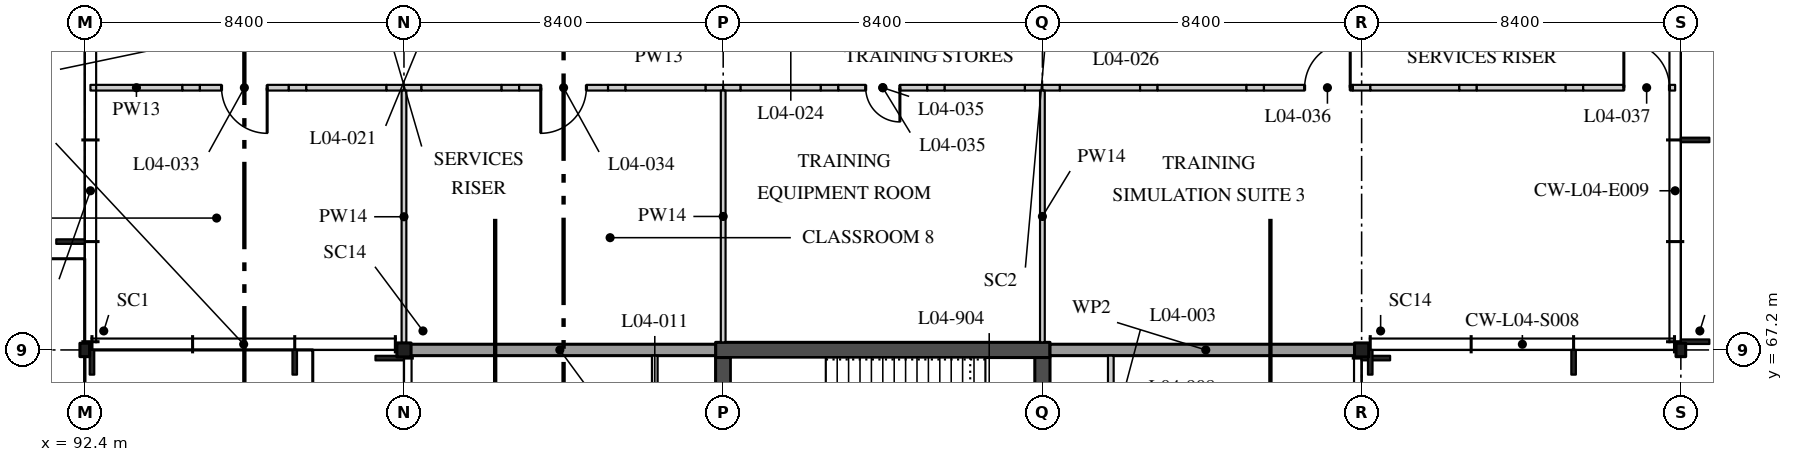
"""IFC4 building model, lengths in metres.
Left out: names, types, materials, properties, quantities, classifications, styles, units other than length and angle.
Written with IfcOpenShell. Run it as: python <this file> out.ifc"""

import sys

from ifc_helpers import new_model, si_unit, direction, frame, frame_2d, origin, origin_2d, place, context, subcontext, project, spatial, rectangle, i_section, extrude, element, fill, save


model = new_model("IFC4")
c1 = context("Model", 3, precision=1e-05, world=origin(), true_north=direction((0.0, 1.0)))
c2 = subcontext(c1, "Body", "Model", "MODEL_VIEW")
j1 = project(units=[si_unit("LENGTHUNIT", "METRE"), si_unit("PLANEANGLEUNIT", "RADIAN")], contexts=[c1])
p1 = place(None, origin())
s1 = spatial("IfcSite", under=j1, at=p1, CompositionType="ELEMENT")
p2 = place(p1, origin())
s2 = spatial("IfcBuilding", under=s1, at=p2, CompositionType="ELEMENT")
p3 = place(p2, frame((0.0, 0.0, 18.9)))
s3 = spatial("IfcBuildingStorey", under=s2, at=p3, CompositionType="ELEMENT", Elevation=18.9)
p4 = place(p3, frame((92.4, 67.2, 0.0), z_axis=(0.0, 0.0, 1.0), x_axis=(1.0, 0.0, 0.0)))
e1 = element("IfcColumn", 1, at=p4, inside=s3, PredefinedType="COLUMN", context=c2, shape_type="SweptSolid", body=[
    extrude(i_section(OverallWidth=0.254, OverallDepth=0.353, WebThickness=0.01, FlangeThickness=0.016, FilletRadius=0.015, at=origin_2d()), origin(), (0.0, 0.0, 1.0), 4.37),
])
for number, where, z_axis, x_axis in (
    (2, (100.8, 67.2, 0.0), (0.0, 0.0, 1.0), (1.0, 0.0, 0.0)),
    (3, (126.0, 67.2, 0.0), (0.0, 0.0, 1.0), (1.0, 0.0, 0.0)),
):
    element("IfcColumn", number, at=place(p3, frame(where, z_axis=z_axis, x_axis=x_axis)), inside=s3, PredefinedType="COLUMN", context=c2, shape_type="SweptSolid", body=[
        extrude(i_section(OverallWidth=0.373, OverallDepth=0.368, WebThickness=0.015, FlangeThickness=0.024, FilletRadius=0.015, at=origin_2d()), origin(), (0.0, 0.0, 1.0), 4.37),
    ])
p5 = place(p3, frame((134.4, 67.2, 0.0), z_axis=(0.0, 0.0, 1.0), x_axis=(1.0, 0.0, 0.0)))
e4 = element("IfcColumn", 4, at=p5, inside=s3, PredefinedType="COLUMN", context=c2, shape_type="SweptSolid", body=[
    extrude(i_section(OverallWidth=0.254, OverallDepth=0.353, WebThickness=0.01, FlangeThickness=0.016, FilletRadius=0.015, at=origin_2d()), origin(), (0.0, 0.0, 1.0), 4.37),
])
p6 = place(p3, frame((109.0, 67.2, 0.0), z_axis=(0.0, 0.0, 1.0), x_axis=(1.0, 0.0, 0.0)))
e5 = element("IfcWall", 5, at=p6, inside=s3, PredefinedType="SHEAR", context=c2, shape_type="SweptSolid", body=[
    extrude(rectangle(XDim=8.8, YDim=0.4, at=frame_2d((4.4, 0.0))), origin(), (0.0, 0.0, 1.0), 4.37),
])
p7 = place(p3, frame((109.2, 59.0, 0.0), z_axis=(0.0, 0.0, 1.0), x_axis=(0.0, 1.0, 0.0)))
e6 = element("IfcWall", 6, at=p7, inside=s3, PredefinedType="SHEAR", context=c2, shape_type="SweptSolid", body=[
    extrude(rectangle(XDim=8.0, YDim=0.4, at=frame_2d((4.0, 0.0))), origin(), (0.0, 0.0, 1.0), 4.37),
])
p8 = place(p7, frame((2.925, 0.0, 0.0)))
e7 = element("IfcOpeningElement", 7, at=p8, cuts=e6, PredefinedType="OPENING", context=c2, shape_type="SweptSolid", body=[
    extrude(rectangle(XDim=1.2, YDim=2.1, at=frame_2d((0.6, 1.05))), frame((0.0, 0.21, 0.0), z_axis=(0.0, -1.0, 0.0), x_axis=(1.0, 0.0, 0.0)), (0.0, 0.0, 1.0), 0.42),
])
p9 = place(p3, frame((117.6, 59.0, 0.0), z_axis=(0.0, 0.0, 1.0), x_axis=(0.0, 1.0, 0.0)))
e8 = element("IfcWall", 8, at=p9, inside=s3, PredefinedType="SHEAR", context=c2, shape_type="SweptSolid", body=[
    extrude(rectangle(XDim=8.0, YDim=0.4, at=frame_2d((4.0, 0.0))), origin(), (0.0, 0.0, 1.0), 4.37),
])
p10 = place(p9, frame((2.925, 0.0, 0.0)))
e9 = element("IfcOpeningElement", 9, at=p10, cuts=e8, PredefinedType="OPENING", context=c2, shape_type="SweptSolid", body=[
    extrude(rectangle(XDim=1.2, YDim=2.1, at=frame_2d((0.6, 1.05))), frame((0.0, 0.21, 0.0), z_axis=(0.0, -1.0, 0.0), x_axis=(1.0, 0.0, 0.0)), (0.0, 0.0, 1.0), 0.42),
])
p11 = place(p3, frame((119.4, 63.0, 0.0), z_axis=(0.0, 0.0, 1.0), x_axis=(0.0, 1.0, 0.0)))
e10 = element("IfcWall", 10, at=p11, inside=s3, PredefinedType="PARTITIONING", context=c2, shape_type="SweptSolid", body=[
    extrude(rectangle(XDim=4.05, YDim=0.15, at=frame_2d((2.025, 0.0))), origin(), (0.0, 0.0, 1.0), 4.37),
])
p12 = place(p11, frame((1.35, 0.0, 0.0)))
e11 = element("IfcOpeningElement", 11, at=p12, cuts=e10, PredefinedType="OPENING", context=c2, shape_type="SweptSolid", body=[
    extrude(rectangle(XDim=0.9, YDim=2.1, at=frame_2d((0.45, 1.05))), frame((0.0, 0.085, 0.0), z_axis=(0.0, -1.0, 0.0), x_axis=(1.0, 0.0, 0.0)), (0.0, 0.0, 1.0), 0.17),
])
p13 = place(p3, frame((107.4, 59.26, 0.0), z_axis=(0.0, 0.0, 1.0), x_axis=(0.0, 1.0, 0.0)))
e12 = element("IfcWall", 12, at=p13, inside=s3, PredefinedType="PARTITIONING", context=c2, shape_type="SweptSolid", body=[
    extrude(rectangle(XDim=7.79, YDim=0.15, at=frame_2d((3.895, 0.0))), origin(), (0.0, 0.0, 1.0), 4.37),
])
p14 = place(p13, frame((2.79, 0.0, 0.0)))
e13 = element("IfcOpeningElement", 13, at=p14, cuts=e12, PredefinedType="OPENING", context=c2, shape_type="SweptSolid", body=[
    extrude(rectangle(XDim=1.35, YDim=2.1, at=frame_2d((0.675, 1.05))), frame((0.0, 0.085, 0.0), z_axis=(0.0, -1.0, 0.0), x_axis=(1.0, 0.0, 0.0)), (0.0, 0.0, 1.0), 0.17),
])
p15 = place(p3, frame((92.55, 74.1, 0.0), z_axis=(0.0, 0.0, 1.0), x_axis=(1.0, 0.0, 0.0)))
e14 = element("IfcWall", 14, at=p15, inside=s3, PredefinedType="PARTITIONING", context=c2, shape_type="SweptSolid", body=[
    extrude(rectangle(XDim=2.42, YDim=0.15, at=frame_2d((1.21, 0.0))), origin(), (0.0, 0.0, 1.0), 4.37),
])
p16 = place(p3, frame((94.97, 74.1, 0.0), z_axis=(0.0, 0.0, 1.0), x_axis=(1.0, 0.0, 0.0)))
e15 = element("IfcWall", 15, at=p16, inside=s3, PredefinedType="PARTITIONING", context=c2, shape_type="SweptSolid", body=[
    extrude(rectangle(XDim=0.46, YDim=0.15, at=frame_2d((0.23, 0.0))), origin(), (0.0, 0.0, 1.0), 3.946),
])
p17 = place(p3, frame((95.43, 74.1, 0.0), z_axis=(0.0, 0.0, 1.0), x_axis=(1.0, 0.0, 0.0)))
e16 = element("IfcWall", 16, at=p17, inside=s3, PredefinedType="PARTITIONING", context=c2, shape_type="SweptSolid", body=[
    extrude(rectangle(XDim=2.34, YDim=0.15, at=frame_2d((1.17, 0.0))), origin(), (0.0, 0.0, 1.0), 4.37),
])
p18 = place(p17, frame((0.57, 0.0, 0.0)))
e17 = element("IfcOpeningElement", 17, at=p18, cuts=e16, PredefinedType="OPENING", context=c2, shape_type="SweptSolid", body=[
    extrude(rectangle(XDim=1.2, YDim=2.4, at=frame_2d((0.6, 1.2))), frame((0.0, 0.085, 0.0), z_axis=(0.0, -1.0, 0.0), x_axis=(1.0, 0.0, 0.0)), (0.0, 0.0, 1.0), 0.17),
])
p19 = place(p3, frame((97.77, 74.1, 0.0), z_axis=(0.0, 0.0, 1.0), x_axis=(1.0, 0.0, 0.0)))
e18 = element("IfcWall", 18, at=p19, inside=s3, PredefinedType="PARTITIONING", context=c2, shape_type="SweptSolid", body=[
    extrude(rectangle(XDim=0.46, YDim=0.15, at=frame_2d((0.23, 0.0))), origin(), (0.0, 0.0, 1.0), 3.946),
])
p20 = place(p3, frame((98.23, 74.1, 0.0), z_axis=(0.0, 0.0, 1.0), x_axis=(1.0, 0.0, 0.0)))
e19 = element("IfcWall", 19, at=p20, inside=s3, PredefinedType="PARTITIONING", context=c2, shape_type="SweptSolid", body=[
    extrude(rectangle(XDim=2.11, YDim=0.15, at=frame_2d((1.055, 0.0))), origin(), (0.0, 0.0, 1.0), 4.37),
])
for number, where, z_axis, x_axis in (
    (20, (100.34, 74.1, 0.0), (0.0, 0.0, 1.0), (1.0, 0.0, 0.0)),
    (21, (100.8, 74.1, 0.0), (0.0, 0.0, 1.0), (1.0, 0.0, 0.0)),
):
    element("IfcWall", number, at=place(p3, frame(where, z_axis=z_axis, x_axis=x_axis)), inside=s3, PredefinedType="PARTITIONING", context=c2, shape_type="SweptSolid", body=[
        extrude(rectangle(XDim=0.46, YDim=0.15, at=frame_2d((0.23, 0.0))), origin(), (0.0, 0.0, 1.0), 3.819),
    ])
p21 = place(p3, frame((101.26, 74.1, 0.0), z_axis=(0.0, 0.0, 1.0), x_axis=(1.0, 0.0, 0.0)))
e22 = element("IfcWall", 22, at=p21, inside=s3, PredefinedType="PARTITIONING", context=c2, shape_type="SweptSolid", body=[
    extrude(rectangle(XDim=2.11, YDim=0.15, at=frame_2d((1.055, 0.0))), origin(), (0.0, 0.0, 1.0), 4.37),
])
p22 = place(p3, frame((103.37, 74.1, 0.0), z_axis=(0.0, 0.0, 1.0), x_axis=(1.0, 0.0, 0.0)))
e23 = element("IfcWall", 23, at=p22, inside=s3, PredefinedType="PARTITIONING", context=c2, shape_type="SweptSolid", body=[
    extrude(rectangle(XDim=0.46, YDim=0.15, at=frame_2d((0.23, 0.0))), origin(), (0.0, 0.0, 1.0), 3.946),
])
p23 = place(p3, frame((103.83, 74.1, 0.0), z_axis=(0.0, 0.0, 1.0), x_axis=(1.0, 0.0, 0.0)))
e24 = element("IfcWall", 24, at=p23, inside=s3, PredefinedType="PARTITIONING", context=c2, shape_type="SweptSolid", body=[
    extrude(rectangle(XDim=2.34, YDim=0.15, at=frame_2d((1.17, 0.0))), origin(), (0.0, 0.0, 1.0), 4.37),
])
p24 = place(p23, frame((0.57, 0.0, 0.0)))
e25 = element("IfcOpeningElement", 25, at=p24, cuts=e24, PredefinedType="OPENING", context=c2, shape_type="SweptSolid", body=[
    extrude(rectangle(XDim=1.2, YDim=2.4, at=frame_2d((0.6, 1.2))), frame((0.0, 0.085, 0.0), z_axis=(0.0, -1.0, 0.0), x_axis=(1.0, 0.0, 0.0)), (0.0, 0.0, 1.0), 0.17),
])
p25 = place(p3, frame((106.17, 74.1, 0.0), z_axis=(0.0, 0.0, 1.0), x_axis=(1.0, 0.0, 0.0)))
e26 = element("IfcWall", 26, at=p25, inside=s3, PredefinedType="PARTITIONING", context=c2, shape_type="SweptSolid", body=[
    extrude(rectangle(XDim=0.46, YDim=0.15, at=frame_2d((0.23, 0.0))), origin(), (0.0, 0.0, 1.0), 3.946),
])
p26 = place(p3, frame((106.63, 74.1, 0.0), z_axis=(0.0, 0.0, 1.0), x_axis=(1.0, 0.0, 0.0)))
e27 = element("IfcWall", 27, at=p26, inside=s3, PredefinedType="PARTITIONING", context=c2, shape_type="SweptSolid", body=[
    extrude(rectangle(XDim=2.11, YDim=0.15, at=frame_2d((1.055, 0.0))), origin(), (0.0, 0.0, 1.0), 4.37),
])
for number, where, z_axis, x_axis in (
    (28, (108.74, 74.1, 0.0), (0.0, 0.0, 1.0), (1.0, 0.0, 0.0)),
    (29, (109.2, 74.1, 0.0), (0.0, 0.0, 1.0), (1.0, 0.0, 0.0)),
):
    element("IfcWall", number, at=place(p3, frame(where, z_axis=z_axis, x_axis=x_axis)), inside=s3, PredefinedType="PARTITIONING", context=c2, shape_type="SweptSolid", body=[
        extrude(rectangle(XDim=0.46, YDim=0.15, at=frame_2d((0.23, 0.0))), origin(), (0.0, 0.0, 1.0), 3.819),
    ])
p27 = place(p3, frame((109.66, 74.1, 0.0), z_axis=(0.0, 0.0, 1.0), x_axis=(1.0, 0.0, 0.0)))
e30 = element("IfcWall", 30, at=p27, inside=s3, PredefinedType="PARTITIONING", context=c2, shape_type="SweptSolid", body=[
    extrude(rectangle(XDim=2.11, YDim=0.15, at=frame_2d((1.055, 0.0))), origin(), (0.0, 0.0, 1.0), 4.37),
])
p28 = place(p3, frame((111.77, 74.1, 0.0), z_axis=(0.0, 0.0, 1.0), x_axis=(1.0, 0.0, 0.0)))
e31 = element("IfcWall", 31, at=p28, inside=s3, PredefinedType="PARTITIONING", context=c2, shape_type="SweptSolid", body=[
    extrude(rectangle(XDim=0.46, YDim=0.15, at=frame_2d((0.23, 0.0))), origin(), (0.0, 0.0, 1.0), 3.946),
])
p29 = place(p3, frame((112.23, 74.1, 0.0), z_axis=(0.0, 0.0, 1.0), x_axis=(1.0, 0.0, 0.0)))
e32 = element("IfcWall", 32, at=p29, inside=s3, PredefinedType="PARTITIONING", context=c2, shape_type="SweptSolid", body=[
    extrude(rectangle(XDim=2.34, YDim=0.15, at=frame_2d((1.17, 0.0))), origin(), (0.0, 0.0, 1.0), 4.37),
])
p30 = place(p29, frame((0.72, 0.0, 0.0)))
e33 = element("IfcOpeningElement", 33, at=p30, cuts=e32, PredefinedType="OPENING", context=c2, shape_type="SweptSolid", body=[
    extrude(rectangle(XDim=0.9, YDim=2.1, at=frame_2d((0.45, 1.05))), frame((0.0, 0.085, 0.0), z_axis=(0.0, -1.0, 0.0), x_axis=(1.0, 0.0, 0.0)), (0.0, 0.0, 1.0), 0.17),
])
p31 = place(p3, frame((114.57, 74.1, 0.0), z_axis=(0.0, 0.0, 1.0), x_axis=(1.0, 0.0, 0.0)))
e34 = element("IfcWall", 34, at=p31, inside=s3, PredefinedType="PARTITIONING", context=c2, shape_type="SweptSolid", body=[
    extrude(rectangle(XDim=0.46, YDim=0.15, at=frame_2d((0.23, 0.0))), origin(), (0.0, 0.0, 1.0), 3.946),
])
p32 = place(p3, frame((115.03, 74.1, 0.0), z_axis=(0.0, 0.0, 1.0), x_axis=(1.0, 0.0, 0.0)))
e35 = element("IfcWall", 35, at=p32, inside=s3, PredefinedType="PARTITIONING", context=c2, shape_type="SweptSolid", body=[
    extrude(rectangle(XDim=2.11, YDim=0.15, at=frame_2d((1.055, 0.0))), origin(), (0.0, 0.0, 1.0), 4.37),
])
p33 = place(p3, frame((117.14, 74.1, 0.0), z_axis=(0.0, 0.0, 1.0), x_axis=(1.0, 0.0, 0.0)))
e36 = element("IfcWall", 36, at=p33, inside=s3, PredefinedType="PARTITIONING", context=c2, shape_type="SweptSolid", body=[
    extrude(rectangle(XDim=0.46, YDim=0.15, at=frame_2d((0.23, 0.0))), origin(), (0.0, 0.0, 1.0), 3.819),
])
p34 = place(p3, frame((117.6, 74.1, 0.0), z_axis=(0.0, 0.0, 1.0), x_axis=(1.0, 0.0, 0.0)))
e37 = element("IfcWall", 37, at=p34, inside=s3, PredefinedType="PARTITIONING", context=c2, shape_type="SweptSolid", body=[
    extrude(rectangle(XDim=0.46, YDim=0.15, at=frame_2d((0.23, 0.0))), origin(), (0.0, 0.0, 1.0), 3.819),
])
p35 = place(p3, frame((118.06, 74.1, 0.0), z_axis=(0.0, 0.0, 1.0), x_axis=(1.0, 0.0, 0.0)))
e38 = element("IfcWall", 38, at=p35, inside=s3, PredefinedType="PARTITIONING", context=c2, shape_type="SweptSolid", body=[
    extrude(rectangle(XDim=2.11, YDim=0.15, at=frame_2d((1.055, 0.0))), origin(), (0.0, 0.0, 1.0), 4.37),
])
p36 = place(p3, frame((120.17, 74.1, 0.0), z_axis=(0.0, 0.0, 1.0), x_axis=(1.0, 0.0, 0.0)))
e39 = element("IfcWall", 39, at=p36, inside=s3, PredefinedType="PARTITIONING", context=c2, shape_type="SweptSolid", body=[
    extrude(rectangle(XDim=0.46, YDim=0.15, at=frame_2d((0.23, 0.0))), origin(), (0.0, 0.0, 1.0), 3.946),
])
p37 = place(p3, frame((120.63, 74.1, 0.0), z_axis=(0.0, 0.0, 1.0), x_axis=(1.0, 0.0, 0.0)))
e40 = element("IfcWall", 40, at=p37, inside=s3, PredefinedType="PARTITIONING", context=c2, shape_type="SweptSolid", body=[
    extrude(rectangle(XDim=2.34, YDim=0.15, at=frame_2d((1.17, 0.0))), origin(), (0.0, 0.0, 1.0), 4.37),
])
p38 = place(p3, frame((122.97, 74.1, 0.0), z_axis=(0.0, 0.0, 1.0), x_axis=(1.0, 0.0, 0.0)))
e41 = element("IfcWall", 41, at=p38, inside=s3, PredefinedType="PARTITIONING", context=c2, shape_type="SweptSolid", body=[
    extrude(rectangle(XDim=0.46, YDim=0.15, at=frame_2d((0.23, 0.0))), origin(), (0.0, 0.0, 1.0), 3.946),
])
p39 = place(p3, frame((123.43, 74.1, 0.0), z_axis=(0.0, 0.0, 1.0), x_axis=(1.0, 0.0, 0.0)))
e42 = element("IfcWall", 42, at=p39, inside=s3, PredefinedType="PARTITIONING", context=c2, shape_type="SweptSolid", body=[
    extrude(rectangle(XDim=2.34, YDim=0.15, at=frame_2d((1.17, 0.0))), origin(), (0.0, 0.0, 1.0), 4.37),
])
p40 = place(p39, frame((1.07, 0.0, 0.0)))
e43 = element("IfcOpeningElement", 43, at=p40, cuts=e42, PredefinedType="OPENING", context=c2, shape_type="SweptSolid", body=[
    extrude(rectangle(XDim=1.2, YDim=2.4, at=frame_2d((0.6, 1.2))), frame((0.0, 0.085, 0.0), z_axis=(0.0, -1.0, 0.0), x_axis=(1.0, 0.0, 0.0)), (0.0, 0.0, 1.0), 0.17),
])
p41 = place(p3, frame((125.77, 74.1, 0.0), z_axis=(0.0, 0.0, 1.0), x_axis=(1.0, 0.0, 0.0)))
e44 = element("IfcWall", 44, at=p41, inside=s3, PredefinedType="PARTITIONING", context=c2, shape_type="SweptSolid", body=[
    extrude(rectangle(XDim=0.46, YDim=0.15, at=frame_2d((0.23, 0.0))), origin(), (0.0, 0.0, 1.0), 3.819),
])
p42 = place(p3, frame((126.23, 74.1, 0.0), z_axis=(0.0, 0.0, 1.0), x_axis=(1.0, 0.0, 0.0)))
e45 = element("IfcWall", 45, at=p42, inside=s3, PredefinedType="PARTITIONING", context=c2, shape_type="SweptSolid", body=[
    extrude(rectangle(XDim=2.34, YDim=0.15, at=frame_2d((1.17, 0.0))), origin(), (0.0, 0.0, 1.0), 4.37),
])
p43 = place(p3, frame((128.57, 74.1, 0.0), z_axis=(0.0, 0.0, 1.0), x_axis=(1.0, 0.0, 0.0)))
e46 = element("IfcWall", 46, at=p43, inside=s3, PredefinedType="PARTITIONING", context=c2, shape_type="SweptSolid", body=[
    extrude(rectangle(XDim=0.46, YDim=0.15, at=frame_2d((0.23, 0.0))), origin(), (0.0, 0.0, 1.0), 3.946),
])
p44 = place(p3, frame((129.03, 74.1, 0.0), z_axis=(0.0, 0.0, 1.0), x_axis=(1.0, 0.0, 0.0)))
e47 = element("IfcWall", 47, at=p44, inside=s3, PredefinedType="PARTITIONING", context=c2, shape_type="SweptSolid", body=[
    extrude(rectangle(XDim=2.34, YDim=0.15, at=frame_2d((1.17, 0.0))), origin(), (0.0, 0.0, 1.0), 4.37),
])
p45 = place(p3, frame((131.37, 74.1, 0.0), z_axis=(0.0, 0.0, 1.0), x_axis=(1.0, 0.0, 0.0)))
e48 = element("IfcWall", 48, at=p45, inside=s3, PredefinedType="PARTITIONING", context=c2, shape_type="SweptSolid", body=[
    extrude(rectangle(XDim=0.46, YDim=0.15, at=frame_2d((0.23, 0.0))), origin(), (0.0, 0.0, 1.0), 3.946),
])
p46 = place(p3, frame((131.83, 74.1, 0.0), z_axis=(0.0, 0.0, 1.0), x_axis=(1.0, 0.0, 0.0)))
e49 = element("IfcWall", 49, at=p46, inside=s3, PredefinedType="PARTITIONING", context=c2, shape_type="SweptSolid", body=[
    extrude(rectangle(XDim=2.42, YDim=0.15, at=frame_2d((1.21, 0.0))), origin(), (0.0, 0.0, 1.0), 4.37),
])
p47 = place(p46, frame((1.07, 0.0, 0.0)))
e50 = element("IfcOpeningElement", 50, at=p47, cuts=e49, PredefinedType="OPENING", context=c2, shape_type="SweptSolid", body=[
    extrude(rectangle(XDim=1.2, YDim=2.4, at=frame_2d((0.6, 1.2))), frame((0.0, 0.085, 0.0), z_axis=(0.0, -1.0, 0.0), x_axis=(1.0, 0.0, 0.0)), (0.0, 0.0, 1.0), 0.17),
])
p48 = place(p3, frame((100.8, 67.384, 0.0), z_axis=(0.0, 0.0, 1.0), x_axis=(0.0, 1.0, 0.0)))
e51 = element("IfcWall", 51, at=p48, inside=s3, PredefinedType="PARTITIONING", context=c2, shape_type="SweptSolid", body=[
    extrude(rectangle(XDim=6.641, YDim=0.125, at=frame_2d((3.32, 0.0))), origin(), (0.0, 0.0, 1.0), 3.819),
])
for number, where, z_axis, x_axis in (
    (52, (109.2, 67.4, 0.0), (0.0, 0.0, 1.0), (0.0, 1.0, 0.0)),
    (53, (117.6, 67.4, 0.0), (0.0, 0.0, 1.0), (0.0, 1.0, 0.0)),
):
    element("IfcWall", number, at=place(p3, frame(where, z_axis=z_axis, x_axis=x_axis)), inside=s3, PredefinedType="PARTITIONING", context=c2, shape_type="SweptSolid", body=[
        extrude(rectangle(XDim=6.625, YDim=0.125, at=frame_2d((3.312, 0.0))), origin(), (0.0, 0.0, 1.0), 3.819),
    ])
for number, where, z_axis, x_axis in (
    (54, (125.997, 67.2, 0.0), (0.0, 0.0, 1.0), (-1.0, 0.0, 0.0)),
    (55, (109.0, 67.2, 0.0), (0.0, 0.0, 1.0), (-1.0, 0.0, 0.0)),
):
    element("IfcWall", number, at=place(p3, frame(where, z_axis=z_axis, x_axis=x_axis)), inside=s3, PredefinedType="SOLIDWALL", context=c2, shape_type="SweptSolid", body=[
        extrude(rectangle(XDim=8.197, YDim=0.3, at=frame_2d((4.099, 0.0))), origin(), (0.0, 0.0, 1.0), 3.746),
    ])
p49 = place(p18, frame((1.2, 0.0, 0.0), z_axis=(0.0, 0.0, 1.0), x_axis=(-1.0, 0.0, 0.0)))
e56 = element("IfcDoor", 56, at=p49, inside=s3, OperationType="SINGLE_SWING_RIGHT", PredefinedType="DOOR", context=c2, shape_type="SweptSolid", body=[
    extrude(rectangle(XDim=1.2, YDim=2.4, at=frame_2d((0.6, 1.2))), frame((0.0, 0.025, 0.0), z_axis=(0.0, -1.0, 0.0), x_axis=(1.0, 0.0, 0.0)), (0.0, 0.0, 1.0), 0.05),
])
fill(e17, e56)
p50 = place(p24, frame((1.2, 0.0, 0.0), z_axis=(0.0, 0.0, 1.0), x_axis=(-1.0, 0.0, 0.0)))
e57 = element("IfcDoor", 57, at=p50, inside=s3, OperationType="SINGLE_SWING_LEFT", PredefinedType="DOOR", context=c2, shape_type="SweptSolid", body=[
    extrude(rectangle(XDim=1.2, YDim=2.4, at=frame_2d((0.6, 1.2))), frame((0.0, 0.025, 0.0), z_axis=(0.0, -1.0, 0.0), x_axis=(1.0, 0.0, 0.0)), (0.0, 0.0, 1.0), 0.05),
])
fill(e25, e57)
p51 = place(p30, frame((0.9, 0.0, 0.0), z_axis=(0.0, 0.0, 1.0), x_axis=(-1.0, 0.0, 0.0)))
e58 = element("IfcDoor", 58, at=p51, inside=s3, OperationType="SINGLE_SWING_RIGHT", PredefinedType="DOOR", context=c2, shape_type="SweptSolid", body=[
    extrude(rectangle(XDim=0.9, YDim=2.1, at=frame_2d((0.45, 1.05))), frame((0.0, 0.025, 0.0), z_axis=(0.0, -1.0, 0.0), x_axis=(1.0, 0.0, 0.0)), (0.0, 0.0, 1.0), 0.05),
])
fill(e33, e58)
p52 = place(p40, origin())
e59 = element("IfcDoor", 59, at=p52, inside=s3, OperationType="SINGLE_SWING_LEFT", PredefinedType="DOOR", context=c2, shape_type="SweptSolid", body=[
    extrude(rectangle(XDim=1.2, YDim=2.4, at=frame_2d((0.6, 1.2))), frame((0.0, 0.025, 0.0), z_axis=(0.0, -1.0, 0.0), x_axis=(1.0, 0.0, 0.0)), (0.0, 0.0, 1.0), 0.05),
])
fill(e43, e59)
p53 = place(p47, origin())
e60 = element("IfcDoor", 60, at=p53, inside=s3, OperationType="SINGLE_SWING_RIGHT", PredefinedType="DOOR", context=c2, shape_type="SweptSolid", body=[
    extrude(rectangle(XDim=1.2, YDim=2.4, at=frame_2d((0.6, 1.2))), frame((0.0, 0.025, 0.0), z_axis=(0.0, -1.0, 0.0), x_axis=(1.0, 0.0, 0.0)), (0.0, 0.0, 1.0), 0.05),
])
fill(e50, e60)
save(model, sys.argv[1])
